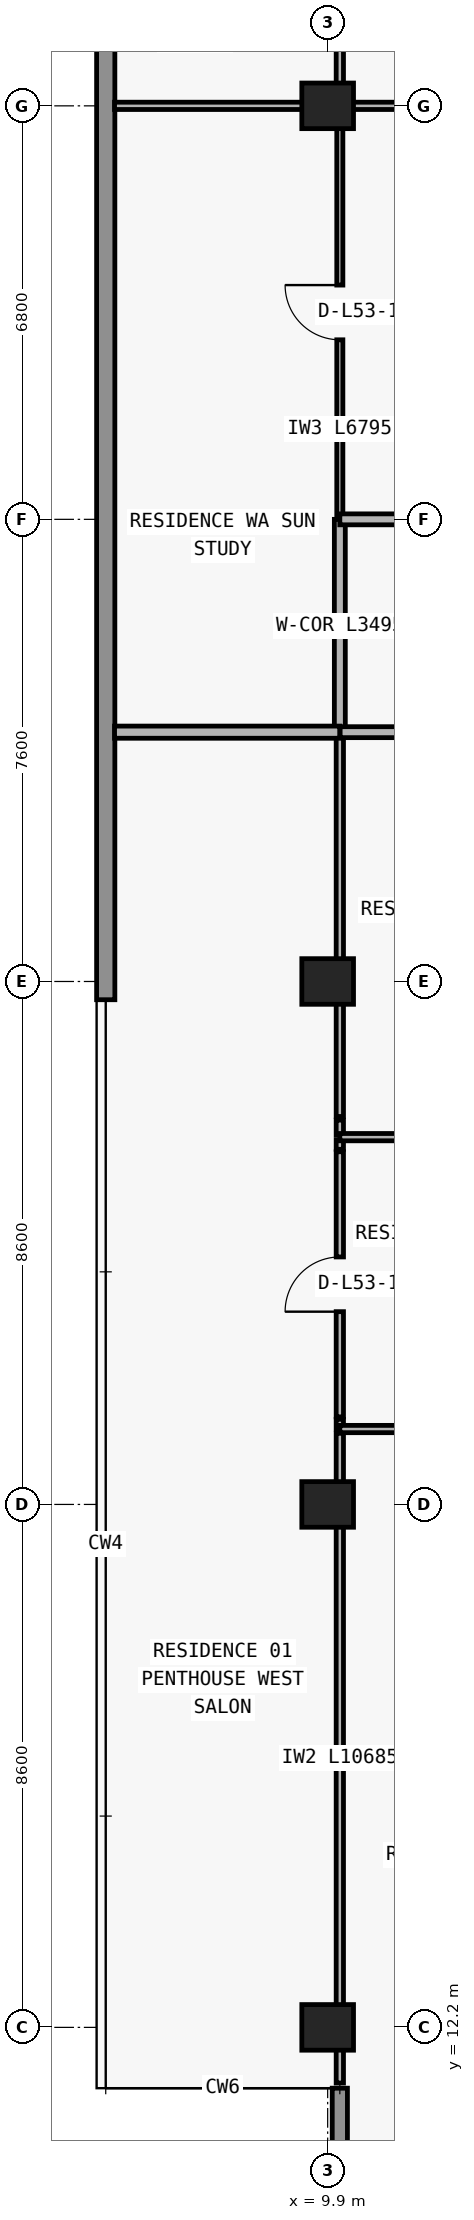
"""IFC4 building model, lengths in metres.
Left out: names, types, materials, properties, quantities, classifications, styles, units other than length and angle.
Written with IfcOpenShell. Run it as: python <this file> out.ifc"""

import sys

from ifc_helpers import new_model, si_unit, direction, frame, frame_2d, origin, origin_2d, place, context, subcontext, project, spatial, rectangle, extrude, element, fill, save


model = new_model("IFC4")
c1 = context("Model", 3, precision=1e-05, world=origin(), true_north=direction((0.0, 1.0)))
c2 = subcontext(c1, "Body", "Model", "MODEL_VIEW")
j1 = project(units=[si_unit("LENGTHUNIT", "METRE"), si_unit("PLANEANGLEUNIT", "RADIAN")], contexts=[c1])
p1 = place(None, origin())
s1 = spatial("IfcSite", under=j1, at=p1, CompositionType="ELEMENT")
p2 = place(p1, origin())
s2 = spatial("IfcBuilding", under=s1, at=p2, CompositionType="ELEMENT")
p3 = place(p2, frame((0.0, 0.0, 191.7)))
s3 = spatial("IfcBuildingStorey", under=s2, at=p3, CompositionType="ELEMENT", Elevation=191.7)
for number, where, z_axis, x_axis in (
    (1, (9.9, 12.2, 0.0), (0.0, 0.0, 1.0), (1.0, 0.0, 0.0)),
    (2, (9.9, 20.8, 0.0), (0.0, 0.0, 1.0), (1.0, 0.0, 0.0)),
    (3, (9.9, 29.4, 0.0), (0.0, 0.0, 1.0), (1.0, 0.0, 0.0)),
    (4, (9.9, 43.8, 0.0), (0.0, 0.0, 1.0), (1.0, 0.0, 0.0)),
):
    element("IfcColumn", number, at=place(p3, frame(where, z_axis=z_axis, x_axis=x_axis)), inside=s3, PredefinedType="COLUMN", context=c2, shape_type="SweptSolid", body=[
        extrude(rectangle(XDim=0.85, YDim=0.75, at=origin_2d()), origin(), (0.0, 0.0, 1.0), 3.05),
    ])
p4 = place(p3, frame((10.1, 11.2, 0.0), z_axis=(0.0, 0.0, 1.0), x_axis=(0.0, -1.0, 0.0)))
e5 = element("IfcWall", 5, at=p4, inside=s3, PredefinedType="ELEMENTEDWALL", context=c2, shape_type="SweptSolid", body=[
    extrude(rectangle(XDim=3.45, YDim=0.25, at=frame_2d((1.725, 0.0))), origin(), (0.0, 0.0, 1.0), 3.05),
])
p5 = place(p3, frame((6.25, 29.1, 0.0), z_axis=(0.0, 0.0, 1.0), x_axis=(0.0, 1.0, 0.0)))
e6 = element("IfcWall", 6, at=p5, inside=s3, PredefinedType="STANDARD", context=c2, shape_type="SweptSolid", body=[
    extrude(rectangle(XDim=17.9, YDim=0.3, at=frame_2d((8.95, 0.0))), origin(), (0.0, 0.0, 1.0), 3.05),
])
p6 = place(p3, frame((10.1, 11.285, 0.0), z_axis=(0.0, 0.0, 1.0), x_axis=(0.0, 1.0, 0.0)))
e7 = element("IfcWall", 7, at=p6, inside=s3, PredefinedType="PARTITIONING", context=c2, shape_type="SweptSolid", body=[
    extrude(rectangle(XDim=10.685, YDim=0.12, at=frame_2d((5.343, 0.0))), origin(), (0.0, 0.0, 1.0), 2.263),
])
p7 = place(p3, frame((10.1, 22.04, 0.0), z_axis=(0.0, 0.0, 1.0), x_axis=(0.0, 1.0, 0.0)))
e8 = element("IfcWall", 8, at=p7, inside=s3, PredefinedType="PARTITIONING", context=c2, shape_type="SweptSolid", body=[
    extrude(rectangle(XDim=0.16, YDim=0.12, at=frame_2d((0.08, 0.0))), origin(), (0.0, 0.0, 1.0), 2.263),
])
p8 = place(p3, frame((10.1, 22.24, 0.0), z_axis=(0.0, 0.0, 1.0), x_axis=(0.0, 1.0, 0.0)))
e9 = element("IfcWall", 9, at=p8, inside=s3, PredefinedType="PARTITIONING", context=c2, shape_type="SweptSolid", body=[
    extrude(rectangle(XDim=4.36, YDim=0.12, at=frame_2d((2.18, 0.0))), origin(), (0.0, 0.0, 1.0), 2.263),
])
p9 = place(p8, frame((1.73, 0.0, 0.0)))
e10 = element("IfcOpeningElement", 10, at=p9, cuts=e9, PredefinedType="OPENING", context=c2, shape_type="SweptSolid", body=[
    extrude(rectangle(XDim=0.9, YDim=2.15, at=frame_2d((0.45, 1.075))), frame((0.0, 0.07, 0.0), z_axis=(0.0, -1.0, 0.0), x_axis=(1.0, 0.0, 0.0)), (0.0, 0.0, 1.0), 0.14),
])
p10 = place(p3, frame((10.1, 26.64, 0.0), z_axis=(0.0, 0.0, 1.0), x_axis=(0.0, 1.0, 0.0)))
e11 = element("IfcWall", 11, at=p10, inside=s3, PredefinedType="PARTITIONING", context=c2, shape_type="SweptSolid", body=[
    extrude(rectangle(XDim=0.16, YDim=0.12, at=frame_2d((0.08, 0.0))), origin(), (0.0, 0.0, 1.0), 2.263),
])
p11 = place(p3, frame((10.1, 26.88, 0.0), z_axis=(0.0, 0.0, 1.0), x_axis=(0.0, 1.0, 0.0)))
e12 = element("IfcWall", 12, at=p11, inside=s3, PredefinedType="PARTITIONING", context=c2, shape_type="SweptSolid", body=[
    extrude(rectangle(XDim=0.24, YDim=0.12, at=frame_2d((0.12, 0.0))), origin(), (0.0, 0.0, 1.0), 2.263),
])
p12 = place(p3, frame((10.1, 27.18, 0.0), z_axis=(0.0, 0.0, 1.0), x_axis=(0.0, 1.0, 0.0)))
e13 = element("IfcWall", 13, at=p12, inside=s3, PredefinedType="PARTITIONING", context=c2, shape_type="SweptSolid", body=[
    extrude(rectangle(XDim=6.32, YDim=0.12, at=frame_2d((3.16, 0.0))), origin(), (0.0, 0.0, 1.0), 2.263),
])
p13 = place(p3, frame((10.1, 33.505, 0.0), z_axis=(0.0, 0.0, 1.0), x_axis=(0.0, 1.0, 0.0)))
e14 = element("IfcWall", 14, at=p13, inside=s3, PredefinedType="PARTITIONING", context=c2, shape_type="SweptSolid", body=[
    extrude(rectangle(XDim=3.495, YDim=0.18, at=frame_2d((1.748, 0.0))), origin(), (0.0, 0.0, 1.0), 2.263),
])
p14 = place(p3, frame((10.1, 37.005, 0.0), z_axis=(0.0, 0.0, 1.0), x_axis=(0.0, 1.0, 0.0)))
e15 = element("IfcWall", 15, at=p14, inside=s3, PredefinedType="MOVABLE", context=c2, shape_type="SweptSolid", body=[
    extrude(rectangle(XDim=6.795, YDim=0.1, at=frame_2d((3.397, 0.0))), origin(), (0.0, 0.0, 1.0), 2.263),
])
p15 = place(p14, frame((2.948, 0.0, 0.0)))
e16 = element("IfcOpeningElement", 16, at=p15, cuts=e15, PredefinedType="OPENING", context=c2, shape_type="SweptSolid", body=[
    extrude(rectangle(XDim=0.9, YDim=2.15, at=frame_2d((0.45, 1.075))), frame((0.0, 0.06, 0.0), z_axis=(0.0, -1.0, 0.0), x_axis=(1.0, 0.0, 0.0)), (0.0, 0.0, 1.0), 0.12),
])
p16 = place(p3, frame((10.1, 43.805, 0.0), z_axis=(0.0, 0.0, 1.0), x_axis=(0.0, 1.0, 0.0)))
e17 = element("IfcWall", 17, at=p16, inside=s3, PredefinedType="PARTITIONING", context=c2, shape_type="SweptSolid", body=[
    extrude(rectangle(XDim=3.075, YDim=0.12, at=frame_2d((1.538, 0.0))), origin(), (0.0, 0.0, 1.0), 3.05),
])
p17 = place(p16, frame((1.087, 0.0, 0.0)))
e18 = element("IfcOpeningElement", 18, at=p17, cuts=e17, PredefinedType="OPENING", context=c2, shape_type="SweptSolid", body=[
    extrude(rectangle(XDim=0.9, YDim=2.15, at=frame_2d((0.45, 1.075))), frame((0.0, 0.07, 0.0), z_axis=(0.0, -1.0, 0.0), x_axis=(1.0, 0.0, 0.0)), (0.0, 0.0, 1.0), 0.14),
])
p18 = place(p3, frame((10.1, 22.04, 0.0), z_axis=(0.0, 0.0, 1.0), x_axis=(1.0, 0.0, 0.0)))
e19 = element("IfcWall", 19, at=p18, inside=s3, PredefinedType="PARTITIONING", context=c2, shape_type="SweptSolid", body=[
    extrude(rectangle(XDim=8.2, YDim=0.12, at=frame_2d((4.1, 0.0))), origin(), (0.0, 0.0, 1.0), 3.05),
])
p19 = place(p18, frame((3.65, 0.0, 0.0)))
e20 = element("IfcOpeningElement", 20, at=p19, cuts=e19, PredefinedType="OPENING", context=c2, shape_type="SweptSolid", body=[
    extrude(rectangle(XDim=0.9, YDim=2.15, at=frame_2d((0.45, 1.075))), frame((0.0, 0.07, 0.0), z_axis=(0.0, -1.0, 0.0), x_axis=(1.0, 0.0, 0.0)), (0.0, 0.0, 1.0), 0.14),
])
p20 = place(p3, frame((10.1, 26.84, 0.0), z_axis=(0.0, 0.0, 1.0), x_axis=(1.0, 0.0, 0.0)))
e21 = element("IfcWall", 21, at=p20, inside=s3, PredefinedType="PARTITIONING", context=c2, shape_type="SweptSolid", body=[
    extrude(rectangle(XDim=8.195, YDim=0.12, at=frame_2d((4.097, 0.0))), origin(), (0.0, 0.0, 1.0), 3.05),
])
p21 = place(p20, frame((2.876, 0.0, 0.0)))
e22 = element("IfcOpeningElement", 22, at=p21, cuts=e21, PredefinedType="OPENING", context=c2, shape_type="SweptSolid", body=[
    extrude(rectangle(XDim=0.9, YDim=2.15, at=frame_2d((0.45, 1.075))), frame((0.0, 0.07, 0.0), z_axis=(0.0, -1.0, 0.0), x_axis=(1.0, 0.0, 0.0)), (0.0, 0.0, 1.0), 0.14),
])
p22 = place(p3, frame((6.395, 33.5, 0.0), z_axis=(0.0, 0.0, 1.0), x_axis=(1.0, 0.0, 0.0)))
e23 = element("IfcWall", 23, at=p22, inside=s3, PredefinedType="PARTITIONING", context=c2, shape_type="SweptSolid", body=[
    extrude(rectangle(XDim=3.705, YDim=0.2, at=frame_2d((1.853, 0.0))), origin(), (0.0, 0.0, 1.0), 3.05),
])
p23 = place(p3, frame((10.105, 33.5, 0.0), z_axis=(0.0, 0.0, 1.0), x_axis=(1.0, 0.0, 0.0)))
e24 = element("IfcWall", 24, at=p23, inside=s3, PredefinedType="PARTITIONING", context=c2, shape_type="SweptSolid", body=[
    extrude(rectangle(XDim=16.545, YDim=0.18, at=frame_2d((8.272, 0.0))), origin(), (0.0, 0.0, 1.0), 3.05),
])
p24 = place(p23, frame((2.824, 0.0, 0.0)))
e25 = element("IfcOpeningElement", 25, at=p24, cuts=e24, PredefinedType="OPENING", context=c2, shape_type="SweptSolid", body=[
    extrude(rectangle(XDim=1.0, YDim=2.2, at=frame_2d((0.5, 1.1))), frame((0.0, 0.1, 0.0), z_axis=(0.0, -1.0, 0.0), x_axis=(1.0, 0.0, 0.0)), (0.0, 0.0, 1.0), 0.2),
])
p25 = place(p3, frame((10.1, 37.0, 0.0), z_axis=(0.0, 0.0, 1.0), x_axis=(1.0, 0.0, 0.0)))
e26 = element("IfcWall", 26, at=p25, inside=s3, PredefinedType="PARTITIONING", context=c2, shape_type="SweptSolid", body=[
    extrude(rectangle(XDim=7.845, YDim=0.18, at=frame_2d((3.922, 0.0))), origin(), (0.0, 0.0, 1.0), 3.05),
])
p26 = place(p25, frame((3.496, 0.0, 0.0)))
e27 = element("IfcOpeningElement", 27, at=p26, cuts=e26, PredefinedType="OPENING", context=c2, shape_type="SweptSolid", body=[
    extrude(rectangle(XDim=1.0, YDim=2.2, at=frame_2d((0.5, 1.1))), frame((0.0, 0.1, 0.0), z_axis=(0.0, -1.0, 0.0), x_axis=(1.0, 0.0, 0.0)), (0.0, 0.0, 1.0), 0.2),
])
p27 = place(p3, frame((6.395, 43.8, 0.0), z_axis=(0.0, 0.0, 1.0), x_axis=(1.0, 0.0, 0.0)))
e28 = element("IfcWall", 28, at=p27, inside=s3, PredefinedType="PARTITIONING", context=c2, shape_type="SweptSolid", body=[
    extrude(rectangle(XDim=11.56, YDim=0.12, at=frame_2d((5.78, 0.0))), origin(), (0.0, 0.0, 1.0), 2.418),
])
p28 = place(p27, frame((7.251, 0.0, 0.0)))
e29 = element("IfcOpeningElement", 29, at=p28, cuts=e28, PredefinedType="OPENING", context=c2, shape_type="SweptSolid", body=[
    extrude(rectangle(XDim=0.9, YDim=2.15, at=frame_2d((0.45, 1.075))), frame((0.0, 0.07, 0.0), z_axis=(0.0, -1.0, 0.0), x_axis=(1.0, 0.0, 0.0)), (0.0, 0.0, 1.0), 0.14),
])
p29 = place(p27, frame((9.982, 0.0, 0.0)))
e30 = element("IfcOpeningElement", 30, at=p29, cuts=e28, PredefinedType="OPENING", context=c2, shape_type="SweptSolid", body=[
    extrude(rectangle(XDim=0.85, YDim=2.1, at=frame_2d((0.425, 1.05))), frame((0.0, 0.07, 0.0), z_axis=(0.0, -1.0, 0.0), x_axis=(1.0, 0.0, 0.0)), (0.0, 0.0, 1.0), 0.14),
])
p30 = place(p9, origin())
e31 = element("IfcDoor", 31, at=p30, inside=s3, OperationType="SINGLE_SWING_LEFT", PredefinedType="DOOR", context=c2, shape_type="SweptSolid", body=[
    extrude(rectangle(XDim=0.9, YDim=2.15, at=frame_2d((0.45, 1.075))), frame((0.0, 0.025, 0.0), z_axis=(0.0, -1.0, 0.0), x_axis=(1.0, 0.0, 0.0)), (0.0, 0.0, 1.0), 0.05),
])
fill(e10, e31)
p31 = place(p15, origin())
e32 = element("IfcDoor", 32, at=p31, inside=s3, OperationType="SINGLE_SWING_RIGHT", PredefinedType="DOOR", context=c2, shape_type="SweptSolid", body=[
    extrude(rectangle(XDim=0.9, YDim=2.15, at=frame_2d((0.45, 1.075))), frame((0.0, 0.025, 0.0), z_axis=(0.0, -1.0, 0.0), x_axis=(1.0, 0.0, 0.0)), (0.0, 0.0, 1.0), 0.05),
])
fill(e16, e32)
save(model, sys.argv[1])
